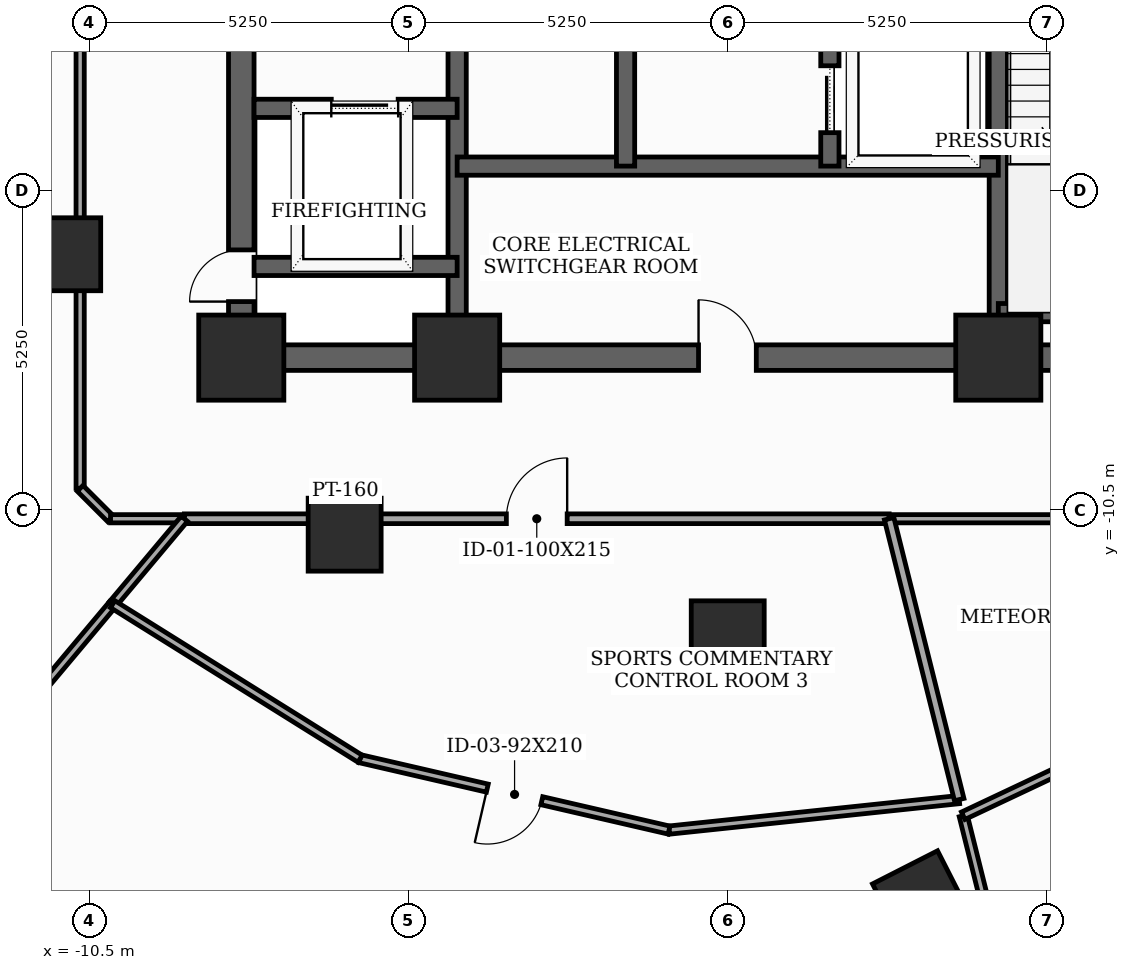
"""IFC4 building model, lengths in metres.
Left out: names, types, materials, properties, quantities, classifications, styles, units other than length and angle.
Written with IfcOpenShell. Run it as: python <this file> out.ifc"""

import sys

from ifc_helpers import new_model, si_unit, direction, frame, frame_2d, origin, origin_2d, place, context, subcontext, project, spatial, rectangle, extrude, element, fill, save


model = new_model("IFC4")
c1 = context("Model", 3, precision=1e-05, world=origin(), true_north=direction((0.0, 1.0)))
c2 = subcontext(c1, "Body", "Model", "MODEL_VIEW")
j1 = project(units=[si_unit("LENGTHUNIT", "METRE"), si_unit("PLANEANGLEUNIT", "RADIAN")], contexts=[c1])
p1 = place(None, origin())
s1 = spatial("IfcSite", under=j1, at=p1, CompositionType="ELEMENT")
p2 = place(p1, origin())
s2 = spatial("IfcBuilding", under=s1, at=p2, CompositionType="ELEMENT")
p3 = place(p2, frame((0.0, 0.0, 123.6)))
s3 = spatial("IfcBuildingStorey", under=s2, at=p3, CompositionType="ELEMENT", Elevation=123.6)
for number, where, z_axis, x_axis in (
    (1, (-8.0, -8.0, 0.0), (0.0, 0.0, 1.0), (1.0, 0.0, 0.0)),
    (2, (-4.45, -8.0, 0.0), (0.0, 0.0, 1.0), (1.0, 0.0, 0.0)),
    (3, (4.45, -8.0, 0.0), (0.0, 0.0, 1.0), (1.0, 0.0, 0.0)),
):
    element("IfcColumn", number, at=place(p3, frame(where, z_axis=z_axis, x_axis=x_axis)), inside=s3, PredefinedType="COLUMN", context=c2, shape_type="SweptSolid", body=[
        extrude(rectangle(XDim=1.4, YDim=1.4, at=origin_2d()), origin(), (0.0, 0.0, 1.0), 3.7),
    ])
for number, where, z_axis, x_axis in (
    (4, (-10.912, -6.3, 0.0), (0.0, 0.0, 1.0), (1.0, 0.0, 0.0)),
    (5, (-6.3, -10.912, 0.0), (0.0, 0.0, 1.0), (1.0, 0.0, 0.0)),
    (6, (0.0, -12.6, 0.0), (0.0, 0.0, 1.0), (1.0, 0.0, 0.0)),
    (7, (3.188, -16.918, 0.0), (0.0, 0.0, 1.0), (0.891, 0.454, 0.0)),
):
    element("IfcColumn", number, at=place(p3, frame(where, z_axis=z_axis, x_axis=x_axis)), inside=s3, PredefinedType="COLUMN", context=c2, shape_type="SweptSolid", body=[
        extrude(rectangle(XDim=1.2, YDim=1.2, at=origin_2d()), origin(), (0.0, 0.0, 1.0), 3.7),
    ])
p4 = place(p3, frame((-8.0, -8.0, 0.0), z_axis=(0.0, 0.0, 1.0), x_axis=(0.0, 1.0, 0.0)))
e8 = element("IfcWall", 8, at=p4, inside=s3, PredefinedType="SHEAR", context=c2, shape_type="SweptSolid", body=[
    extrude(rectangle(XDim=16.0, YDim=0.42, at=frame_2d((8.0, 0.0))), origin(), (0.0, 0.0, 1.0), 3.5),
])
p5 = place(p4, frame((0.922, 0.0, 0.0)))
e9 = element("IfcOpeningElement", 9, at=p5, cuts=e8, PredefinedType="OPENING", context=c2, shape_type="SweptSolid", body=[
    extrude(rectangle(XDim=0.85, YDim=2.02, at=frame_2d((0.425, 1.01))), frame((0.0, 0.22, 0.0), z_axis=(0.0, -1.0, 0.0), x_axis=(1.0, 0.0, 0.0)), (0.0, 0.0, 1.0), 0.44),
])
p6 = place(p4, frame((5.35, 0.0, 0.0)))
e10 = element("IfcOpeningElement", 10, at=p6, cuts=e8, PredefinedType="OPENING", context=c2, shape_type="SweptSolid", body=[
    extrude(rectangle(XDim=1.05, YDim=2.15, at=frame_2d((0.525, 1.075))), frame((0.0, 0.22, 0.0), z_axis=(0.0, -1.0, 0.0), x_axis=(1.0, 0.0, 0.0)), (0.0, 0.0, 1.0), 0.44),
])
p7 = place(p3, frame((-8.0, -8.0, 0.0), z_axis=(0.0, 0.0, 1.0), x_axis=(1.0, 0.0, 0.0)))
e11 = element("IfcWall", 11, at=p7, inside=s3, PredefinedType="SHEAR", context=c2, shape_type="SweptSolid", body=[
    extrude(rectangle(XDim=16.0, YDim=0.42, at=frame_2d((8.0, 0.0))), origin(), (0.0, 0.0, 1.0), 3.5),
])
p8 = place(p7, frame((7.52, 0.0, 0.0)))
e12 = element("IfcOpeningElement", 12, at=p8, cuts=e11, PredefinedType="OPENING", context=c2, shape_type="SweptSolid", body=[
    extrude(rectangle(XDim=0.95, YDim=2.1, at=frame_2d((0.475, 1.05))), frame((0.0, 0.22, 0.0), z_axis=(0.0, -1.0, 0.0), x_axis=(1.0, 0.0, 0.0)), (0.0, 0.0, 1.0), 0.44),
])
for number, where, z_axis, x_axis in (
    (13, (-4.45, -7.79, 0.0), (0.0, 0.0, 1.0), (0.0, 1.0, 0.0)),
    (14, (4.45, -7.79, 0.0), (0.0, 0.0, 1.0), (0.0, 1.0, 0.0)),
):
    element("IfcWall", number, at=place(p3, frame(where, z_axis=z_axis, x_axis=x_axis)), inside=s3, PredefinedType="SHEAR", context=c2, shape_type="SweptSolid", body=[
        extrude(rectangle(XDim=15.58, YDim=0.3, at=frame_2d((7.79, 0.0))), origin(), (0.0, 0.0, 1.0), 3.5),
    ])
p9 = place(p3, frame((4.45, -7.26, 0.0), z_axis=(0.0, 0.0, 1.0), x_axis=(1.0, 0.0, 0.0)))
e15 = element("IfcWall", 15, at=p9, inside=s3, PredefinedType="SHEAR", context=c2, shape_type="SweptSolid", body=[
    extrude(rectangle(XDim=3.55, YDim=0.3, at=frame_2d((1.775, 0.0))), origin(), (0.0, 0.0, 1.0), 3.5),
])
p10 = place(p3, frame((-7.79, -3.9, 0.0), z_axis=(0.0, 0.0, 1.0), x_axis=(1.0, 0.0, 0.0)))
e16 = element("IfcWall", 16, at=p10, inside=s3, PredefinedType="SHEAR", context=c2, shape_type="SweptSolid", body=[
    extrude(rectangle(XDim=3.34, YDim=0.3, at=frame_2d((1.67, 0.0))), origin(), (0.0, 0.0, 1.0), 3.5),
])
p11 = place(p10, frame((1.27, 0.0, 0.0)))
e17 = element("IfcOpeningElement", 17, at=p11, cuts=e16, PredefinedType="OPENING", context=c2, shape_type="SweptSolid", body=[
    extrude(rectangle(XDim=1.1, YDim=2.1, at=frame_2d((0.55, 1.05))), frame((0.0, 0.16, 0.0), z_axis=(0.0, -1.0, 0.0), x_axis=(1.0, 0.0, 0.0)), (0.0, 0.0, 1.0), 0.32),
])
p12 = place(p3, frame((-7.79, -6.5, 0.0), z_axis=(0.0, 0.0, 1.0), x_axis=(1.0, 0.0, 0.0)))
e18 = element("IfcWall", 18, at=p12, inside=s3, PredefinedType="SHEAR", context=c2, shape_type="SweptSolid", body=[
    extrude(rectangle(XDim=3.34, YDim=0.3, at=frame_2d((1.67, 0.0))), origin(), (0.0, 0.0, 1.0), 3.5),
])
p13 = place(p3, frame((-4.45, -4.85, 0.0), z_axis=(0.0, 0.0, 1.0), x_axis=(1.0, 0.0, 0.0)))
e19 = element("IfcWall", 19, at=p13, inside=s3, PredefinedType="SHEAR", context=c2, shape_type="SweptSolid", body=[
    extrude(rectangle(XDim=8.9, YDim=0.3, at=frame_2d((4.45, 0.0))), origin(), (0.0, 0.0, 1.0), 3.5),
])
p14 = place(p3, frame((-1.68, -4.85, 0.0), z_axis=(0.0, 0.0, 1.0), x_axis=(0.0, 1.0, 0.0)))
e20 = element("IfcWall", 20, at=p14, inside=s3, PredefinedType="SHEAR", context=c2, shape_type="SweptSolid", body=[
    extrude(rectangle(XDim=12.64, YDim=0.3, at=frame_2d((6.32, 0.0))), origin(), (0.0, 0.0, 1.0), 3.5),
])
p15 = place(p14, frame((2.6, 0.0, 0.0)))
e21 = element("IfcOpeningElement", 21, at=p15, cuts=e20, PredefinedType="OPENING", context=c2, shape_type="SweptSolid", body=[
    extrude(rectangle(XDim=0.95, YDim=2.1, at=frame_2d((0.475, 1.05))), frame((0.0, 0.16, 0.0), z_axis=(0.0, -1.0, 0.0), x_axis=(1.0, 0.0, 0.0)), (0.0, 0.0, 1.0), 0.32),
])
p16 = place(p14, frame((8.8, 0.0, 0.0)))
e22 = element("IfcOpeningElement", 22, at=p16, cuts=e20, PredefinedType="OPENING", context=c2, shape_type="SweptSolid", body=[
    extrude(rectangle(XDim=0.95, YDim=2.1, at=frame_2d((0.475, 1.05))), frame((0.0, 0.16, 0.0), z_axis=(0.0, -1.0, 0.0), x_axis=(1.0, 0.0, 0.0)), (0.0, 0.0, 1.0), 0.32),
])
p17 = place(p3, frame((1.68, -4.85, 0.0), z_axis=(0.0, 0.0, 1.0), x_axis=(0.0, 1.0, 0.0)))
e23 = element("IfcWall", 23, at=p17, inside=s3, PredefinedType="SHEAR", context=c2, shape_type="SweptSolid", body=[
    extrude(rectangle(XDim=12.64, YDim=0.3, at=frame_2d((6.32, 0.0))), origin(), (0.0, 0.0, 1.0), 3.5),
])
p18 = place(p17, frame((0.55, 0.0, 0.0)))
e24 = element("IfcOpeningElement", 24, at=p18, cuts=e23, PredefinedType="OPENING", context=c2, shape_type="SweptSolid", body=[
    extrude(rectangle(XDim=1.1, YDim=2.1, at=frame_2d((0.55, 1.05))), frame((0.0, 0.16, 0.0), z_axis=(0.0, -1.0, 0.0), x_axis=(1.0, 0.0, 0.0)), (0.0, 0.0, 1.0), 0.32),
])
p19 = place(p17, frame((2.65, 0.0, 0.0)))
e25 = element("IfcOpeningElement", 25, at=p19, cuts=e23, PredefinedType="OPENING", context=c2, shape_type="SweptSolid", body=[
    extrude(rectangle(XDim=1.1, YDim=2.1, at=frame_2d((0.55, 1.05))), frame((0.0, 0.16, 0.0), z_axis=(0.0, -1.0, 0.0), x_axis=(1.0, 0.0, 0.0)), (0.0, 0.0, 1.0), 0.32),
])
p20 = place(p17, frame((4.75, 0.0, 0.0)))
e26 = element("IfcOpeningElement", 26, at=p20, cuts=e23, PredefinedType="OPENING", context=c2, shape_type="SweptSolid", body=[
    extrude(rectangle(XDim=1.1, YDim=2.1, at=frame_2d((0.55, 1.05))), frame((0.0, 0.16, 0.0), z_axis=(0.0, -1.0, 0.0), x_axis=(1.0, 0.0, 0.0)), (0.0, 0.0, 1.0), 0.32),
])
p21 = place(p17, frame((6.85, 0.0, 0.0)))
e27 = element("IfcOpeningElement", 27, at=p21, cuts=e23, PredefinedType="OPENING", context=c2, shape_type="SweptSolid", body=[
    extrude(rectangle(XDim=1.1, YDim=2.1, at=frame_2d((0.55, 1.05))), frame((0.0, 0.16, 0.0), z_axis=(0.0, -1.0, 0.0), x_axis=(1.0, 0.0, 0.0)), (0.0, 0.0, 1.0), 0.32),
])
p22 = place(p17, frame((8.95, 0.0, 0.0)))
e28 = element("IfcOpeningElement", 28, at=p22, cuts=e23, PredefinedType="OPENING", context=c2, shape_type="SweptSolid", body=[
    extrude(rectangle(XDim=1.1, YDim=2.1, at=frame_2d((0.55, 1.05))), frame((0.0, 0.16, 0.0), z_axis=(0.0, -1.0, 0.0), x_axis=(1.0, 0.0, 0.0)), (0.0, 0.0, 1.0), 0.32),
])
p23 = place(p17, frame((11.05, 0.0, 0.0)))
e29 = element("IfcOpeningElement", 29, at=p23, cuts=e23, PredefinedType="OPENING", context=c2, shape_type="SweptSolid", body=[
    extrude(rectangle(XDim=1.1, YDim=2.1, at=frame_2d((0.55, 1.05))), frame((0.0, 0.16, 0.0), z_axis=(0.0, -1.0, 0.0), x_axis=(1.0, 0.0, 0.0)), (0.0, 0.0, 1.0), 0.32),
])
p24 = place(p3, frame((-10.65, -2.264, 0.0), z_axis=(0.0, 0.0, 1.0), x_axis=(0.0, -1.0, 0.0)))
e30 = element("IfcWall", 30, at=p24, inside=s3, PredefinedType="PARTITIONING", context=c2, shape_type="SweptSolid", body=[
    extrude(rectangle(XDim=7.886, YDim=0.135, at=frame_2d((3.943, 0.0))), origin(), (0.0, 0.0, 1.0), 2.785),
])
p25 = place(p3, frame((-10.65, -10.15, 0.0), z_axis=(0.0, 0.0, 1.0), x_axis=(0.707106781187, -0.707106781187, 0.0)))
e31 = element("IfcWall", 31, at=p25, inside=s3, PredefinedType="PARTITIONING", context=c2, shape_type="SweptSolid", body=[
    extrude(rectangle(XDim=0.707, YDim=0.135, at=frame_2d((0.354, 0.0))), origin(), (0.0, 0.0, 1.0), 3.5),
])
p26 = place(p3, frame((-10.15, -10.65, 0.0), z_axis=(0.0, 0.0, 1.0), x_axis=(1.0, 0.0, 0.0)))
e32 = element("IfcWall", 32, at=p26, inside=s3, PredefinedType="PARTITIONING", context=c2, shape_type="SweptSolid", body=[
    extrude(rectangle(XDim=1.214, YDim=0.135, at=frame_2d((0.607, 0.0))), origin(), (0.0, 0.0, 1.0), 3.5),
])
p27 = place(p3, frame((-8.936, -10.65, 0.0), z_axis=(0.0, 0.0, 1.0), x_axis=(1.0, 0.0, 0.0)))
e33 = element("IfcWall", 33, at=p27, inside=s3, PredefinedType="PARTITIONING", context=c2, shape_type="SweptSolid", body=[
    extrude(rectangle(XDim=11.591, YDim=0.16, at=frame_2d((5.795, 0.0))), origin(), (0.0, 0.0, 1.0), 2.785),
])
p28 = place(p27, frame((5.295, 0.0, 0.0)))
e34 = element("IfcOpeningElement", 34, at=p28, cuts=e33, PredefinedType="OPENING", context=c2, shape_type="SweptSolid", body=[
    extrude(rectangle(XDim=1.0, YDim=2.15, at=frame_2d((0.5, 1.075))), frame((0.0, 0.09, 0.0), z_axis=(0.0, -1.0, 0.0), x_axis=(1.0, 0.0, 0.0)), (0.0, 0.0, 1.0), 0.18),
])
p29 = place(p3, frame((2.655, -10.65, 0.0), z_axis=(0.0, 0.0, 1.0), x_axis=(1.0, 0.0, 0.0)))
e35 = element("IfcWall", 35, at=p29, inside=s3, PredefinedType="PARTITIONING", context=c2, shape_type="SweptSolid", body=[
    extrude(rectangle(XDim=7.495, YDim=0.135, at=frame_2d((3.748, 0.0))), origin(), (0.0, 0.0, 1.0), 2.785),
])
p30 = place(p3, frame((-18.896, -22.52, 0.0), z_axis=(0.0, 0.0, 1.0), x_axis=(0.642815636807, 0.766020924698, 0.0)))
e36 = element("IfcWall", 36, at=p30, inside=s3, PredefinedType="PARTITIONING", context=c2, shape_type="SweptSolid", body=[
    extrude(rectangle(XDim=13.661, YDim=0.135, at=frame_2d((6.831, 0.0))), origin(), (0.0, 0.0, 1.0), 2.985),
])
p31 = place(p3, frame((-10.115, -12.055, 0.0), z_axis=(0.0, 0.0, 1.0), x_axis=(0.64278617419, 0.766045647642, 0.0)))
e37 = element("IfcWall", 37, at=p31, inside=s3, PredefinedType="PARTITIONING", context=c2, shape_type="SweptSolid", body=[
    extrude(rectangle(XDim=1.834, YDim=0.135, at=frame_2d((0.917, 0.0))), origin(), (0.0, 0.0, 1.0), 3.5),
])
p32 = place(p3, frame((-10.65, -2.264, 0.0), z_axis=(0.0, 0.0, 1.0), x_axis=(-0.978145824013, -0.207920049456, 0.0)))
e38 = element("IfcWall", 38, at=p32, inside=s3, PredefinedType="PARTITIONING", context=c2, shape_type="SweptSolid", body=[
    extrude(rectangle(XDim=5.431, YDim=0.135, at=frame_2d((2.715, 0.0))), origin(), (0.0, 0.0, 1.0), 2.785),
])
p33 = place(p32, frame((2.255, 0.0, 0.0)))
e39 = element("IfcOpeningElement", 39, at=p33, cuts=e38, PredefinedType="OPENING", context=c2, shape_type="SweptSolid", body=[
    extrude(rectangle(XDim=0.92, YDim=2.1, at=frame_2d((0.46, 1.05))), frame((0.0, 0.077, 0.0), z_axis=(0.0, -1.0, 0.0), x_axis=(1.0, 0.0, 0.0)), (0.0, 0.0, 1.0), 0.155),
])
p34 = place(p3, frame((3.807, -15.269, 0.0), z_axis=(0.0, 0.0, 1.0), x_axis=(-0.994513256503, -0.104610623932, 0.0)))
e40 = element("IfcWall", 40, at=p34, inside=s3, PredefinedType="PARTITIONING", context=c2, shape_type="SweptSolid", body=[
    extrude(rectangle(XDim=4.798, YDim=0.135, at=frame_2d((2.399, 0.0))), origin(), (0.0, 0.0, 1.0), 2.885),
])
p35 = place(p3, frame((-0.965, -15.771, 0.0), z_axis=(0.0, 0.0, 1.0), x_axis=(-0.974324872008, 0.225146716135, 0.0)))
e41 = element("IfcWall", 41, at=p35, inside=s3, PredefinedType="PARTITIONING", context=c2, shape_type="SweptSolid", body=[
    extrude(rectangle(XDim=5.215, YDim=0.135, at=frame_2d((2.607, 0.0))), origin(), (0.0, 0.0, 1.0), 2.885),
])
p36 = place(p35, frame((2.147, 0.0, 0.0)))
e42 = element("IfcOpeningElement", 42, at=p36, cuts=e41, PredefinedType="OPENING", context=c2, shape_type="SweptSolid", body=[
    extrude(rectangle(XDim=0.92, YDim=2.1, at=frame_2d((0.46, 1.05))), frame((0.0, 0.077, 0.0), z_axis=(0.0, -1.0, 0.0), x_axis=(1.0, 0.0, 0.0)), (0.0, 0.0, 1.0), 0.155),
])
p37 = place(p3, frame((-6.046, -14.597, 0.0), z_axis=(0.0, 0.0, 1.0), x_axis=(-0.848109776096, 0.529820542912, 0.0)))
e43 = element("IfcWall", 43, at=p37, inside=s3, PredefinedType="PARTITIONING", context=c2, shape_type="SweptSolid", body=[
    extrude(rectangle(XDim=4.798, YDim=0.135, at=frame_2d((2.399, 0.0))), origin(), (0.0, 0.0, 1.0), 3.5),
])
p38 = place(p3, frame((4.393, -17.618, 0.0), z_axis=(0.0, 0.0, 1.0), x_axis=(-0.242107483306, 0.970249435211, 0.0)))
e44 = element("IfcWall", 44, at=p38, inside=s3, PredefinedType="PARTITIONING", context=c2, shape_type="SweptSolid", body=[
    extrude(rectangle(XDim=2.147, YDim=0.135, at=frame_2d((1.073, 0.0))), origin(), (0.0, 0.0, 1.0), 2.985),
])
p39 = place(p3, frame((3.807, -15.269, 0.0), z_axis=(0.0, 0.0, 1.0), x_axis=(-0.241956377954, 0.970287128209, 0.0)))
e45 = element("IfcWall", 45, at=p39, inside=s3, PredefinedType="PARTITIONING", context=c2, shape_type="SweptSolid", body=[
    extrude(rectangle(XDim=4.76, YDim=0.16, at=frame_2d((2.38, 0.0))), origin(), (0.0, 0.0, 1.0), 2.785),
])
p40 = place(p3, frame((3.873, -15.535, 0.0), z_axis=(0.0, 0.0, 1.0), x_axis=(0.904472849066, 0.426531200855, 0.0)))
e46 = element("IfcWall", 46, at=p40, inside=s3, PredefinedType="PARTITIONING", context=c2, shape_type="SweptSolid", body=[
    extrude(rectangle(XDim=6.677, YDim=0.135, at=frame_2d((3.338, 0.0))), origin(), (0.0, 0.0, 1.0), 3.5),
])
p41 = place(p40, frame((2.878, 0.0, 0.0)))
e47 = element("IfcOpeningElement", 47, at=p41, cuts=e46, PredefinedType="OPENING", context=c2, shape_type="SweptSolid", body=[
    extrude(rectangle(XDim=0.92, YDim=2.1, at=frame_2d((0.46, 1.05))), frame((0.0, 0.077, 0.0), z_axis=(0.0, -1.0, 0.0), x_axis=(1.0, 0.0, 0.0)), (0.0, 0.0, 1.0), 0.155),
])
p42 = place(p5, origin())
e48 = element("IfcDoor", 48, at=p42, inside=s3, OperationType="SINGLE_SWING_LEFT", PredefinedType="TRAPDOOR", context=c2, shape_type="SweptSolid", body=[
    extrude(rectangle(XDim=0.85, YDim=2.02, at=frame_2d((0.425, 1.01))), frame((0.0, 0.025, 0.0), z_axis=(0.0, -1.0, 0.0), x_axis=(1.0, 0.0, 0.0)), (0.0, 0.0, 1.0), 0.05),
])
fill(e9, e48)
p43 = place(p8, origin())
e49 = element("IfcDoor", 49, at=p43, inside=s3, OperationType="SINGLE_SWING_LEFT", PredefinedType="DOOR", context=c2, shape_type="SweptSolid", body=[
    extrude(rectangle(XDim=0.95, YDim=2.1, at=frame_2d((0.475, 1.05))), frame((0.0, 0.025, 0.0), z_axis=(0.0, -1.0, 0.0), x_axis=(1.0, 0.0, 0.0)), (0.0, 0.0, 1.0), 0.05),
])
fill(e12, e49)
p44 = place(p11, origin())
e50 = element("IfcDoor", 50, at=p44, inside=s3, OperationType="SLIDING_TO_LEFT", PredefinedType="DOOR", context=c2, shape_type="SweptSolid", body=[
    extrude(rectangle(XDim=1.1, YDim=2.1, at=frame_2d((0.55, 1.05))), frame((0.0, 0.025, 0.0), z_axis=(0.0, -1.0, 0.0), x_axis=(1.0, 0.0, 0.0)), (0.0, 0.0, 1.0), 0.05),
])
fill(e17, e50)
p45 = place(p18, origin())
e51 = element("IfcDoor", 51, at=p45, inside=s3, OperationType="SLIDING_TO_LEFT", PredefinedType="DOOR", context=c2, shape_type="SweptSolid", body=[
    extrude(rectangle(XDim=1.1, YDim=2.1, at=frame_2d((0.55, 1.05))), frame((0.0, 0.025, 0.0), z_axis=(0.0, -1.0, 0.0), x_axis=(1.0, 0.0, 0.0)), (0.0, 0.0, 1.0), 0.05),
])
fill(e24, e51)
p46 = place(p28, origin())
e52 = element("IfcDoor", 52, at=p46, inside=s3, OperationType="SINGLE_SWING_RIGHT", PredefinedType="DOOR", context=c2, shape_type="SweptSolid", body=[
    extrude(rectangle(XDim=1.0, YDim=2.15, at=frame_2d((0.5, 1.075))), frame((0.0, 0.025, 0.0), z_axis=(0.0, -1.0, 0.0), x_axis=(1.0, 0.0, 0.0)), (0.0, 0.0, 1.0), 0.05),
])
fill(e34, e52)
p47 = place(p36, origin())
e53 = element("IfcDoor", 53, at=p47, inside=s3, OperationType="SINGLE_SWING_RIGHT", PredefinedType="DOOR", context=c2, shape_type="SweptSolid", body=[
    extrude(rectangle(XDim=0.92, YDim=2.1, at=frame_2d((0.46, 1.05))), frame((0.0, 0.025, 0.0), z_axis=(0.0, -1.0, 0.0), x_axis=(1.0, 0.0, 0.0)), (0.0, 0.0, 1.0), 0.05),
])
fill(e42, e53)
save(model, sys.argv[1])
